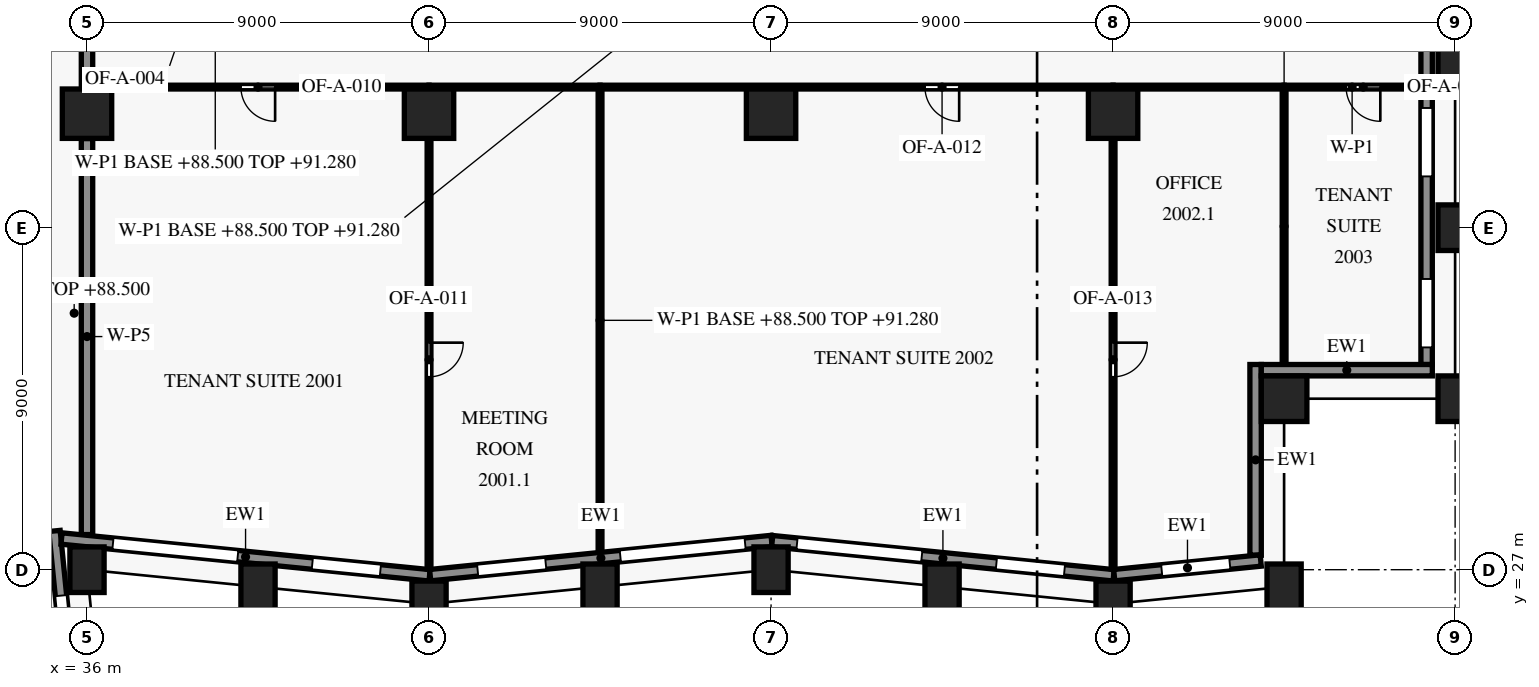
"""IFC4 building model, lengths in metres.
Left out: names, types, materials, properties, quantities, classifications, styles, units other than length and angle.
Written with IfcOpenShell. Run it as: python <this file> out.ifc"""

import sys

from ifc_helpers import new_model, si_unit, direction, frame, frame_2d, origin, origin_2d, place, context, subcontext, project, spatial, rectangle, extrude, element, fill, save


model = new_model("IFC4")
c1 = context("Model", 3, precision=1e-05, world=origin(), true_north=direction((0.0, 1.0)))
c2 = subcontext(c1, "Body", "Model", "MODEL_VIEW")
j1 = project(units=[si_unit("LENGTHUNIT", "METRE"), si_unit("PLANEANGLEUNIT", "RADIAN")], contexts=[c1])
p1 = place(None, origin())
s1 = spatial("IfcSite", under=j1, at=p1, CompositionType="ELEMENT")
p2 = place(p1, origin())
s2 = spatial("IfcBuilding", under=s1, at=p2, CompositionType="ELEMENT")
p3 = place(p2, frame((0.0, 0.0, 88.5)))
s3 = spatial("IfcBuildingStorey", under=s2, at=p3, CompositionType="ELEMENT", Elevation=88.5)
for number, where, z_axis, x_axis in (
    (1, (36.0, 27.0, 0.0), (0.0, 0.0, 1.0), (-0.1, 0.995, 0.0)),
    (2, (40.5, 26.55, 0.0), (0.0, 0.0, 1.0), (0.995, -0.1, 0.0)),
    (3, (45.0, 26.1, 0.0), (0.0, 0.0, 1.0), (1.0, 0.0, 0.0)),
    (4, (49.5, 26.55, 0.0), (0.0, 0.0, 1.0), (0.995, 0.1, 0.0)),
    (5, (54.0, 27.0, 0.0), (0.0, 0.0, 1.0), (1.0, 0.0, 0.0)),
    (6, (58.5, 26.55, 0.0), (0.0, 0.0, 1.0), (0.995, -0.1, 0.0)),
    (7, (63.0, 26.1, 0.0), (0.0, 0.0, 1.0), (1.0, 0.0, 0.0)),
    (8, (67.5, 26.55, 0.0), (0.0, 0.0, 1.0), (0.995, 0.1, 0.0)),
    (9, (72.0, 31.5, 0.0), (0.0, 0.0, 1.0), (0.0, 1.0, 0.0)),
    (10, (72.0, 36.0, 0.0), (0.0, 0.0, 1.0), (0.0, 1.0, 0.0)),
    (11, (72.0, 40.5, 0.0), (0.0, 0.0, 1.0), (0.0, 1.0, 0.0)),
):
    element("IfcColumn", number, at=place(p3, frame(where, z_axis=z_axis, x_axis=x_axis)), inside=s3, PredefinedType="COLUMN", context=c2, shape_type="SweptSolid", body=[
        extrude(rectangle(XDim=0.9, YDim=1.2, at=origin_2d()), origin(), (0.0, 0.0, 1.0), 3.8),
    ])
p4 = place(p3, frame((67.5, 31.5, 0.0), z_axis=(0.0, 0.0, 1.0), x_axis=(1.0, 0.0, 0.0)))
e12 = element("IfcColumn", 12, at=p4, inside=s3, PredefinedType="COLUMN", context=c2, shape_type="SweptSolid", body=[
    extrude(rectangle(XDim=1.2, YDim=1.2, at=origin_2d()), origin(), (0.0, 0.0, 1.0), 3.8),
])
for number, where, z_axis, x_axis in (
    (13, (36.0, 39.0, 0.0), (0.0, 0.0, 1.0), (1.0, 0.0, 0.0)),
    (14, (45.0, 39.0, 0.0), (0.0, 0.0, 1.0), (1.0, 0.0, 0.0)),
    (15, (54.0, 39.0, 0.0), (0.0, 0.0, 1.0), (1.0, 0.0, 0.0)),
    (16, (63.0, 39.0, 0.0), (0.0, 0.0, 1.0), (1.0, 0.0, 0.0)),
):
    element("IfcColumn", number, at=place(p3, frame(where, z_axis=z_axis, x_axis=x_axis)), inside=s3, PredefinedType="COLUMN", context=c2, shape_type="SweptSolid", body=[
        extrude(rectangle(XDim=1.3, YDim=1.3, at=origin_2d()), origin(), (0.0, 0.0, 1.0), 3.8),
    ])
p5 = place(p3, frame((35.144, 28.02, 0.0), z_axis=(0.0, 0.0, 1.0), x_axis=(0.099503719021, -0.99503719021, 0.0)))
e17 = element("IfcWall", 17, at=p5, inside=s3, PredefinedType="SOLIDWALL", context=c2, shape_type="SweptSolid", body=[
    extrude(rectangle(XDim=10.04, YDim=0.3, at=frame_2d((5.02, 0.0))), origin(), (0.0, 0.0, 1.0), 3.15),
])
p6 = place(p5, frame((1.711, 0.0, 0.15)))
e18 = element("IfcOpeningElement", 18, at=p6, cuts=e17, PredefinedType="OPENING", context=c2, shape_type="SweptSolid", body=[
    extrude(rectangle(XDim=3.3, YDim=2.4, at=frame_2d((1.65, 1.2))), frame((0.0, 0.16, 0.0), z_axis=(0.0, -1.0, 0.0), x_axis=(1.0, 0.0, 0.0)), (0.0, 0.0, 1.0), 0.32),
])
p7 = place(p5, frame((6.984, 0.0, 0.75)))
e19 = element("IfcOpeningElement", 19, at=p7, cuts=e17, PredefinedType="OPENING", context=c2, shape_type="SweptSolid", body=[
    extrude(rectangle(XDim=1.8, YDim=1.8, at=frame_2d((0.9, 0.9))), frame((0.0, 0.16, 0.0), z_axis=(0.0, -1.0, 0.0), x_axis=(1.0, 0.0, 0.0)), (0.0, 0.0, 1.0), 0.32),
])
p8 = place(p3, frame((45.015, 26.852, 0.0), z_axis=(0.0, 0.0, 1.0), x_axis=(-0.995037438546, 0.099501235631, 0.0)))
e20 = element("IfcWall", 20, at=p8, inside=s3, PredefinedType="SOLIDWALL", context=c2, shape_type="SweptSolid", body=[
    extrude(rectangle(XDim=9.734, YDim=0.3, at=frame_2d((4.867, 0.0))), origin(), (0.0, 0.0, 1.0), 3.15),
])
p9 = place(p8, frame((1.301, 0.0, 0.75)))
e21 = element("IfcOpeningElement", 21, at=p9, cuts=e20, PredefinedType="OPENING", context=c2, shape_type="SweptSolid", body=[
    extrude(rectangle(XDim=1.8, YDim=1.8, at=frame_2d((0.9, 0.9))), frame((0.0, 0.16, 0.0), z_axis=(0.0, -1.0, 0.0), x_axis=(1.0, 0.0, 0.0)), (0.0, 0.0, 1.0), 0.32),
])
p10 = place(p8, frame((5.073, 0.0, 0.15)))
e22 = element("IfcOpeningElement", 22, at=p10, cuts=e20, PredefinedType="OPENING", context=c2, shape_type="SweptSolid", body=[
    extrude(rectangle(XDim=3.3, YDim=2.4, at=frame_2d((1.65, 1.2))), frame((0.0, 0.16, 0.0), z_axis=(0.0, -1.0, 0.0), x_axis=(1.0, 0.0, 0.0)), (0.0, 0.0, 1.0), 0.32),
])
p11 = place(p3, frame((54.015, 27.755, 0.0), z_axis=(0.0, 0.0, 1.0), x_axis=(-0.995037993253, -0.099495688264, 0.0)))
e23 = element("IfcWall", 23, at=p11, inside=s3, PredefinedType="SOLIDWALL", context=c2, shape_type="SweptSolid", body=[
    extrude(rectangle(XDim=9.03, YDim=0.3, at=frame_2d((4.515, 0.0))), origin(), (0.0, 0.0, 1.0), 3.15),
])
p12 = place(p11, frame((0.701, 0.0, 0.15)))
e24 = element("IfcOpeningElement", 24, at=p12, cuts=e23, PredefinedType="OPENING", context=c2, shape_type="SweptSolid", body=[
    extrude(rectangle(XDim=3.3, YDim=2.4, at=frame_2d((1.65, 1.2))), frame((0.0, 0.16, 0.0), z_axis=(0.0, -1.0, 0.0), x_axis=(1.0, 0.0, 0.0)), (0.0, 0.0, 1.0), 0.32),
])
p13 = place(p11, frame((5.974, 0.0, 0.75)))
e25 = element("IfcOpeningElement", 25, at=p13, cuts=e23, PredefinedType="OPENING", context=c2, shape_type="SweptSolid", body=[
    extrude(rectangle(XDim=1.8, YDim=1.8, at=frame_2d((0.9, 0.9))), frame((0.0, 0.16, 0.0), z_axis=(0.0, -1.0, 0.0), x_axis=(1.0, 0.0, 0.0)), (0.0, 0.0, 1.0), 0.32),
])
p14 = place(p3, frame((63.015, 26.852, 0.0), z_axis=(0.0, 0.0, 1.0), x_axis=(-0.995037993253, 0.099495688264, 0.0)))
e26 = element("IfcWall", 26, at=p14, inside=s3, PredefinedType="SOLIDWALL", context=c2, shape_type="SweptSolid", body=[
    extrude(rectangle(XDim=9.03, YDim=0.3, at=frame_2d((4.515, 0.0))), origin(), (0.0, 0.0, 1.0), 3.15),
])
p15 = place(p14, frame((1.301, 0.0, 0.75)))
e27 = element("IfcOpeningElement", 27, at=p15, cuts=e26, PredefinedType="OPENING", context=c2, shape_type="SweptSolid", body=[
    extrude(rectangle(XDim=1.8, YDim=1.8, at=frame_2d((0.9, 0.9))), frame((0.0, 0.16, 0.0), z_axis=(0.0, -1.0, 0.0), x_axis=(1.0, 0.0, 0.0)), (0.0, 0.0, 1.0), 0.32),
])
p16 = place(p14, frame((5.073, 0.0, 0.15)))
e28 = element("IfcOpeningElement", 28, at=p16, cuts=e26, PredefinedType="OPENING", context=c2, shape_type="SweptSolid", body=[
    extrude(rectangle(XDim=3.3, YDim=2.4, at=frame_2d((1.65, 1.2))), frame((0.0, 0.16, 0.0), z_axis=(0.0, -1.0, 0.0), x_axis=(1.0, 0.0, 0.0)), (0.0, 0.0, 1.0), 0.32),
])
p17 = place(p3, frame((66.885, 27.242, 0.0), z_axis=(0.0, 0.0, 1.0), x_axis=(-0.995037814081, -0.099497480111, 0.0)))
e29 = element("IfcWall", 29, at=p17, inside=s3, PredefinedType="SOLIDWALL", context=c2, shape_type="SweptSolid", body=[
    extrude(rectangle(XDim=3.875, YDim=0.3, at=frame_2d((1.937, 0.0))), origin(), (0.0, 0.0, 1.0), 3.15),
])
p18 = place(p17, frame((0.818, 0.0, 0.75)))
e30 = element("IfcOpeningElement", 30, at=p18, cuts=e29, PredefinedType="OPENING", context=c2, shape_type="SweptSolid", body=[
    extrude(rectangle(XDim=1.8, YDim=1.8, at=frame_2d((0.9, 0.9))), frame((0.0, 0.16, 0.0), z_axis=(0.0, -1.0, 0.0), x_axis=(1.0, 0.0, 0.0)), (0.0, 0.0, 1.0), 0.32),
])
p19 = place(p3, frame((66.75, 32.4, 0.0), z_axis=(0.0, 0.0, 1.0), x_axis=(0.0, -1.0, 0.0)))
e31 = element("IfcWall", 31, at=p19, inside=s3, PredefinedType="SOLIDWALL", context=c2, shape_type="SweptSolid", body=[
    extrude(rectangle(XDim=5.019, YDim=0.3, at=frame_2d((2.51, 0.0))), origin(), (0.0, 0.0, 1.0), 3.15),
])
p20 = place(p3, frame((71.4, 32.25, 0.0), z_axis=(0.0, 0.0, 1.0), x_axis=(-1.0, 0.0, 0.0)))
e32 = element("IfcWall", 32, at=p20, inside=s3, PredefinedType="SOLIDWALL", context=c2, shape_type="SweptSolid", body=[
    extrude(rectangle(XDim=4.5, YDim=0.3, at=frame_2d((2.25, 0.0))), origin(), (0.0, 0.0, 1.0), 3.15),
])
p21 = place(p3, frame((71.25, 57.9, 0.0), z_axis=(0.0, 0.0, 1.0), x_axis=(0.0, -1.0, 0.0)))
e33 = element("IfcWall", 33, at=p21, inside=s3, PredefinedType="SOLIDWALL", context=c2, shape_type="SweptSolid", body=[
    extrude(rectangle(XDim=25.502, YDim=0.3, at=frame_2d((12.751, 0.0))), origin(), (0.0, 0.0, 1.0), 3.15),
])
p22 = place(p21, frame((0.75, 0.0, 0.75)))
e34 = element("IfcOpeningElement", 34, at=p22, cuts=e33, PredefinedType="OPENING", context=c2, shape_type="SweptSolid", body=[
    extrude(rectangle(XDim=1.8, YDim=1.8, at=frame_2d((0.9, 0.9))), frame((0.0, 0.16, 0.0), z_axis=(0.0, -1.0, 0.0), x_axis=(1.0, 0.0, 0.0)), (0.0, 0.0, 1.0), 0.32),
])
p23 = place(p21, frame((5.25, 0.0, 0.75)))
e35 = element("IfcOpeningElement", 35, at=p23, cuts=e33, PredefinedType="OPENING", context=c2, shape_type="SweptSolid", body=[
    extrude(rectangle(XDim=1.8, YDim=1.8, at=frame_2d((0.9, 0.9))), frame((0.0, 0.16, 0.0), z_axis=(0.0, -1.0, 0.0), x_axis=(1.0, 0.0, 0.0)), (0.0, 0.0, 1.0), 0.32),
])
p24 = place(p21, frame((9.0, 0.0, 0.15)))
e36 = element("IfcOpeningElement", 36, at=p24, cuts=e33, PredefinedType="OPENING", context=c2, shape_type="SweptSolid", body=[
    extrude(rectangle(XDim=3.3, YDim=2.4, at=frame_2d((1.65, 1.2))), frame((0.0, 0.16, 0.0), z_axis=(0.0, -1.0, 0.0), x_axis=(1.0, 0.0, 0.0)), (0.0, 0.0, 1.0), 0.32),
])
p25 = place(p21, frame((13.5, 0.0, 0.15)))
e37 = element("IfcOpeningElement", 37, at=p25, cuts=e33, PredefinedType="OPENING", context=c2, shape_type="SweptSolid", body=[
    extrude(rectangle(XDim=3.3, YDim=2.4, at=frame_2d((1.65, 1.2))), frame((0.0, 0.16, 0.0), z_axis=(0.0, -1.0, 0.0), x_axis=(1.0, 0.0, 0.0)), (0.0, 0.0, 1.0), 0.32),
])
p26 = place(p21, frame((18.75, 0.0, 0.75)))
e38 = element("IfcOpeningElement", 38, at=p26, cuts=e33, PredefinedType="OPENING", context=c2, shape_type="SweptSolid", body=[
    extrude(rectangle(XDim=1.8, YDim=1.8, at=frame_2d((0.9, 0.9))), frame((0.0, 0.16, 0.0), z_axis=(0.0, -1.0, 0.0), x_axis=(1.0, 0.0, 0.0)), (0.0, 0.0, 1.0), 0.32),
])
p27 = place(p21, frame((23.25, 0.0, 0.75)))
e39 = element("IfcOpeningElement", 39, at=p27, cuts=e33, PredefinedType="OPENING", context=c2, shape_type="SweptSolid", body=[
    extrude(rectangle(XDim=1.8, YDim=1.8, at=frame_2d((0.9, 0.9))), frame((0.0, 0.16, 0.0), z_axis=(0.0, -1.0, 0.0), x_axis=(1.0, 0.0, 0.0)), (0.0, 0.0, 1.0), 0.32),
])
for number, where, z_axis, x_axis in (
    (40, (24.655, 27.0, 0.0), (0.0, 0.0, 1.0), (1.0, 0.0, 0.0)),
    (41, (36.0, 27.925, 0.0), (0.0, 0.0, 1.0), (0.0, 1.0, 0.0)),
):
    element("IfcWall", number, at=place(p3, frame(where, z_axis=z_axis, x_axis=x_axis)), inside=s3, PredefinedType="PARTITIONING", context=c2, shape_type="SweptSolid", body=[
        extrude(rectangle(XDim=10.42, YDim=0.3, at=frame_2d((5.21, 0.0))), origin(), (0.0, 0.0, 1.0), 2.78),
    ])
p28 = place(p3, frame((45.0, 38.345, 0.0), z_axis=(0.0, 0.0, 1.0), x_axis=(0.0, -1.0, 0.0)))
e42 = element("IfcWall", 42, at=p28, inside=s3, PredefinedType="PARTITIONING", context=c2, shape_type="SweptSolid", body=[
    extrude(rectangle(XDim=11.321, YDim=0.1, at=frame_2d((5.66, 0.0))), origin(), (0.0, 0.0, 1.0), 2.88),
])
p29 = place(p28, frame((5.37, 0.0, 0.0)))
e43 = element("IfcOpeningElement", 43, at=p29, cuts=e42, PredefinedType="OPENING", context=c2, shape_type="SweptSolid", body=[
    extrude(rectangle(XDim=0.9, YDim=2.1, at=frame_2d((0.45, 1.05))), frame((0.0, 0.06, 0.0), z_axis=(0.0, -1.0, 0.0), x_axis=(1.0, 0.0, 0.0)), (0.0, 0.0, 1.0), 0.12),
])
p30 = place(p3, frame((63.0, 38.345, 0.0), z_axis=(0.0, 0.0, 1.0), x_axis=(0.0, -1.0, 0.0)))
e44 = element("IfcWall", 44, at=p30, inside=s3, PredefinedType="PARTITIONING", context=c2, shape_type="SweptSolid", body=[
    extrude(rectangle(XDim=11.321, YDim=0.1, at=frame_2d((5.66, 0.0))), origin(), (0.0, 0.0, 1.0), 2.88),
])
p31 = place(p30, frame((5.37, 0.0, 0.0)))
e45 = element("IfcOpeningElement", 45, at=p31, cuts=e44, PredefinedType="OPENING", context=c2, shape_type="SweptSolid", body=[
    extrude(rectangle(XDim=0.9, YDim=2.1, at=frame_2d((0.45, 1.05))), frame((0.0, 0.06, 0.0), z_axis=(0.0, -1.0, 0.0), x_axis=(1.0, 0.0, 0.0)), (0.0, 0.0, 1.0), 0.12),
])
p32 = place(p3, frame((49.5, 39.65, 0.0), z_axis=(0.0, 0.0, 1.0), x_axis=(0.0, -1.0, 0.0)))
e46 = element("IfcWall", 46, at=p32, inside=s3, PredefinedType="PARTITIONING", context=c2, shape_type="SweptSolid", body=[
    extrude(rectangle(XDim=12.175, YDim=0.1, at=frame_2d((6.088, 0.0))), origin(), (0.0, 0.0, 1.0), 2.78),
])
p33 = place(p3, frame((67.5, 39.65, 0.0), z_axis=(0.0, 0.0, 1.0), x_axis=(0.0, -1.0, 0.0)))
e47 = element("IfcWall", 47, at=p33, inside=s3, PredefinedType="PARTITIONING", context=c2, shape_type="SweptSolid", body=[
    extrude(rectangle(XDim=7.23, YDim=0.1, at=frame_2d((3.615, 0.0))), origin(), (0.0, 0.0, 1.0), 2.78),
])
p34 = place(p3, frame((45.0, 39.7, 0.0), z_axis=(0.0, 0.0, 1.0), x_axis=(-1.0, 0.0, 0.0)))
e48 = element("IfcWall", 48, at=p34, inside=s3, PredefinedType="PARTITIONING", context=c2, shape_type="SweptSolid", body=[
    extrude(rectangle(XDim=8.95, YDim=0.1, at=frame_2d((4.475, 0.0))), origin(), (0.0, 0.0, 1.0), 2.78),
])
p35 = place(p34, frame((4.05, 0.0, 0.0)))
e49 = element("IfcOpeningElement", 49, at=p35, cuts=e48, PredefinedType="OPENING", context=c2, shape_type="SweptSolid", body=[
    extrude(rectangle(XDim=0.9, YDim=2.1, at=frame_2d((0.45, 1.05))), frame((0.0, 0.06, 0.0), z_axis=(0.0, -1.0, 0.0), x_axis=(1.0, 0.0, 0.0)), (0.0, 0.0, 1.0), 0.12),
])
p36 = place(p3, frame((49.5, 39.7, 0.0), z_axis=(0.0, 0.0, 1.0), x_axis=(-1.0, 0.0, 0.0)))
e50 = element("IfcWall", 50, at=p36, inside=s3, PredefinedType="PARTITIONING", context=c2, shape_type="SweptSolid", body=[
    extrude(rectangle(XDim=4.5, YDim=0.1, at=frame_2d((2.25, 0.0))), origin(), (0.0, 0.0, 1.0), 2.88),
])
p37 = place(p3, frame((63.0, 39.7, 0.0), z_axis=(0.0, 0.0, 1.0), x_axis=(-1.0, 0.0, 0.0)))
e51 = element("IfcWall", 51, at=p37, inside=s3, PredefinedType="PARTITIONING", context=c2, shape_type="SweptSolid", body=[
    extrude(rectangle(XDim=13.5, YDim=0.1, at=frame_2d((6.75, 0.0))), origin(), (0.0, 0.0, 1.0), 2.88),
])
p38 = place(p37, frame((4.05, 0.0, 0.0)))
e52 = element("IfcOpeningElement", 52, at=p38, cuts=e51, PredefinedType="OPENING", context=c2, shape_type="SweptSolid", body=[
    extrude(rectangle(XDim=0.9, YDim=2.1, at=frame_2d((0.45, 1.05))), frame((0.0, 0.06, 0.0), z_axis=(0.0, -1.0, 0.0), x_axis=(1.0, 0.0, 0.0)), (0.0, 0.0, 1.0), 0.12),
])
p39 = place(p3, frame((67.5, 39.7, 0.0), z_axis=(0.0, 0.0, 1.0), x_axis=(-1.0, 0.0, 0.0)))
e53 = element("IfcWall", 53, at=p39, inside=s3, PredefinedType="PARTITIONING", context=c2, shape_type="SweptSolid", body=[
    extrude(rectangle(XDim=4.5, YDim=0.1, at=frame_2d((2.25, 0.0))), origin(), (0.0, 0.0, 1.0), 2.88),
])
p40 = place(p3, frame((71.08, 39.7, 0.0), z_axis=(0.0, 0.0, 1.0), x_axis=(-1.0, 0.0, 0.0)))
e54 = element("IfcWall", 54, at=p40, inside=s3, PredefinedType="PARTITIONING", context=c2, shape_type="SweptSolid", body=[
    extrude(rectangle(XDim=3.58, YDim=0.1, at=frame_2d((1.79, 0.0))), origin(), (0.0, 0.0, 1.0), 3.48),
])
p41 = place(p40, frame((1.048, 0.0, 0.0)))
e55 = element("IfcOpeningElement", 55, at=p41, cuts=e54, PredefinedType="OPENING", context=c2, shape_type="SweptSolid", body=[
    extrude(rectangle(XDim=0.9, YDim=2.1, at=frame_2d((0.45, 1.05))), frame((0.0, 0.06, 0.0), z_axis=(0.0, -1.0, 0.0), x_axis=(1.0, 0.0, 0.0)), (0.0, 0.0, 1.0), 0.12),
])
p42 = place(p3, frame((36.0, 39.67, 0.0), z_axis=(0.0, 0.0, 1.0), x_axis=(0.0, 1.0, 0.0)))
e56 = element("IfcWall", 56, at=p42, inside=s3, PredefinedType="PARTITIONING", context=c2, shape_type="SweptSolid", body=[
    extrude(rectangle(XDim=3.18, YDim=0.3, at=frame_2d((1.59, 0.0))), origin(), (0.0, 0.0, 1.0), 2.78),
])
p43 = place(p6, origin())
e57 = element("IfcWindow", 57, at=p43, inside=s3, PartitioningType="SINGLE_PANEL", PredefinedType="WINDOW", context=c2, shape_type="SweptSolid", body=[
    extrude(rectangle(XDim=3.3, YDim=2.4, at=frame_2d((1.65, 1.2))), frame((0.0, 0.03, 0.0), z_axis=(0.0, -1.0, 0.0), x_axis=(1.0, 0.0, 0.0)), (0.0, 0.0, 1.0), 0.06),
])
fill(e18, e57)
p44 = place(p9, origin())
e58 = element("IfcWindow", 58, at=p44, inside=s3, PartitioningType="SINGLE_PANEL", PredefinedType="WINDOW", context=c2, shape_type="SweptSolid", body=[
    extrude(rectangle(XDim=1.8, YDim=1.8, at=frame_2d((0.9, 0.9))), frame((0.0, 0.03, 0.0), z_axis=(0.0, -1.0, 0.0), x_axis=(1.0, 0.0, 0.0)), (0.0, 0.0, 1.0), 0.06),
])
fill(e21, e58)
p45 = place(p10, origin())
e59 = element("IfcWindow", 59, at=p45, inside=s3, PartitioningType="SINGLE_PANEL", PredefinedType="WINDOW", context=c2, shape_type="SweptSolid", body=[
    extrude(rectangle(XDim=3.3, YDim=2.4, at=frame_2d((1.65, 1.2))), frame((0.0, 0.03, 0.0), z_axis=(0.0, -1.0, 0.0), x_axis=(1.0, 0.0, 0.0)), (0.0, 0.0, 1.0), 0.06),
])
fill(e22, e59)
p46 = place(p12, origin())
e60 = element("IfcWindow", 60, at=p46, inside=s3, PartitioningType="SINGLE_PANEL", PredefinedType="WINDOW", context=c2, shape_type="SweptSolid", body=[
    extrude(rectangle(XDim=3.3, YDim=2.4, at=frame_2d((1.65, 1.2))), frame((0.0, 0.03, 0.0), z_axis=(0.0, -1.0, 0.0), x_axis=(1.0, 0.0, 0.0)), (0.0, 0.0, 1.0), 0.06),
])
fill(e24, e60)
p47 = place(p13, origin())
e61 = element("IfcWindow", 61, at=p47, inside=s3, PartitioningType="SINGLE_PANEL", PredefinedType="WINDOW", context=c2, shape_type="SweptSolid", body=[
    extrude(rectangle(XDim=1.8, YDim=1.8, at=frame_2d((0.9, 0.9))), frame((0.0, 0.03, 0.0), z_axis=(0.0, -1.0, 0.0), x_axis=(1.0, 0.0, 0.0)), (0.0, 0.0, 1.0), 0.06),
])
fill(e25, e61)
p48 = place(p15, origin())
e62 = element("IfcWindow", 62, at=p48, inside=s3, PartitioningType="SINGLE_PANEL", PredefinedType="WINDOW", context=c2, shape_type="SweptSolid", body=[
    extrude(rectangle(XDim=1.8, YDim=1.8, at=frame_2d((0.9, 0.9))), frame((0.0, 0.03, 0.0), z_axis=(0.0, -1.0, 0.0), x_axis=(1.0, 0.0, 0.0)), (0.0, 0.0, 1.0), 0.06),
])
fill(e27, e62)
p49 = place(p16, origin())
e63 = element("IfcWindow", 63, at=p49, inside=s3, PartitioningType="SINGLE_PANEL", PredefinedType="WINDOW", context=c2, shape_type="SweptSolid", body=[
    extrude(rectangle(XDim=3.3, YDim=2.4, at=frame_2d((1.65, 1.2))), frame((0.0, 0.03, 0.0), z_axis=(0.0, -1.0, 0.0), x_axis=(1.0, 0.0, 0.0)), (0.0, 0.0, 1.0), 0.06),
])
fill(e28, e63)
p50 = place(p18, origin())
e64 = element("IfcWindow", 64, at=p50, inside=s3, PartitioningType="SINGLE_PANEL", PredefinedType="WINDOW", context=c2, shape_type="SweptSolid", body=[
    extrude(rectangle(XDim=1.8, YDim=1.8, at=frame_2d((0.9, 0.9))), frame((0.0, 0.03, 0.0), z_axis=(0.0, -1.0, 0.0), x_axis=(1.0, 0.0, 0.0)), (0.0, 0.0, 1.0), 0.06),
])
fill(e30, e64)
p51 = place(p26, origin())
e65 = element("IfcWindow", 65, at=p51, inside=s3, PartitioningType="SINGLE_PANEL", PredefinedType="WINDOW", context=c2, shape_type="SweptSolid", body=[
    extrude(rectangle(XDim=1.8, YDim=1.8, at=frame_2d((0.9, 0.9))), frame((0.0, 0.03, 0.0), z_axis=(0.0, -1.0, 0.0), x_axis=(1.0, 0.0, 0.0)), (0.0, 0.0, 1.0), 0.06),
])
fill(e38, e65)
p52 = place(p27, origin())
e66 = element("IfcWindow", 66, at=p52, inside=s3, PartitioningType="SINGLE_PANEL", PredefinedType="WINDOW", context=c2, shape_type="SweptSolid", body=[
    extrude(rectangle(XDim=1.8, YDim=1.8, at=frame_2d((0.9, 0.9))), frame((0.0, 0.03, 0.0), z_axis=(0.0, -1.0, 0.0), x_axis=(1.0, 0.0, 0.0)), (0.0, 0.0, 1.0), 0.06),
])
fill(e39, e66)
p53 = place(p35, origin())
e67 = element("IfcDoor", 67, at=p53, inside=s3, OperationType="SINGLE_SWING_LEFT", PredefinedType="DOOR", context=c2, shape_type="SweptSolid", body=[
    extrude(rectangle(XDim=0.9, YDim=2.1, at=frame_2d((0.45, 1.05))), frame((0.0, 0.025, 0.0), z_axis=(0.0, -1.0, 0.0), x_axis=(1.0, 0.0, 0.0)), (0.0, 0.0, 1.0), 0.05),
])
fill(e49, e67)
p54 = place(p29, origin())
e68 = element("IfcDoor", 68, at=p54, inside=s3, OperationType="SINGLE_SWING_LEFT", PredefinedType="DOOR", context=c2, shape_type="SweptSolid", body=[
    extrude(rectangle(XDim=0.9, YDim=2.1, at=frame_2d((0.45, 1.05))), frame((0.0, 0.025, 0.0), z_axis=(0.0, -1.0, 0.0), x_axis=(1.0, 0.0, 0.0)), (0.0, 0.0, 1.0), 0.05),
])
fill(e43, e68)
p55 = place(p38, origin())
e69 = element("IfcDoor", 69, at=p55, inside=s3, OperationType="SINGLE_SWING_LEFT", PredefinedType="DOOR", context=c2, shape_type="SweptSolid", body=[
    extrude(rectangle(XDim=0.9, YDim=2.1, at=frame_2d((0.45, 1.05))), frame((0.0, 0.025, 0.0), z_axis=(0.0, -1.0, 0.0), x_axis=(1.0, 0.0, 0.0)), (0.0, 0.0, 1.0), 0.05),
])
fill(e52, e69)
p56 = place(p31, origin())
e70 = element("IfcDoor", 70, at=p56, inside=s3, OperationType="SINGLE_SWING_LEFT", PredefinedType="DOOR", context=c2, shape_type="SweptSolid", body=[
    extrude(rectangle(XDim=0.9, YDim=2.1, at=frame_2d((0.45, 1.05))), frame((0.0, 0.025, 0.0), z_axis=(0.0, -1.0, 0.0), x_axis=(1.0, 0.0, 0.0)), (0.0, 0.0, 1.0), 0.05),
])
fill(e45, e70)
p57 = place(p41, origin())
e71 = element("IfcDoor", 71, at=p57, inside=s3, OperationType="SINGLE_SWING_LEFT", PredefinedType="DOOR", context=c2, shape_type="SweptSolid", body=[
    extrude(rectangle(XDim=0.9, YDim=2.1, at=frame_2d((0.45, 1.05))), frame((0.0, 0.025, 0.0), z_axis=(0.0, -1.0, 0.0), x_axis=(1.0, 0.0, 0.0)), (0.0, 0.0, 1.0), 0.05),
])
fill(e55, e71)
save(model, sys.argv[1])
